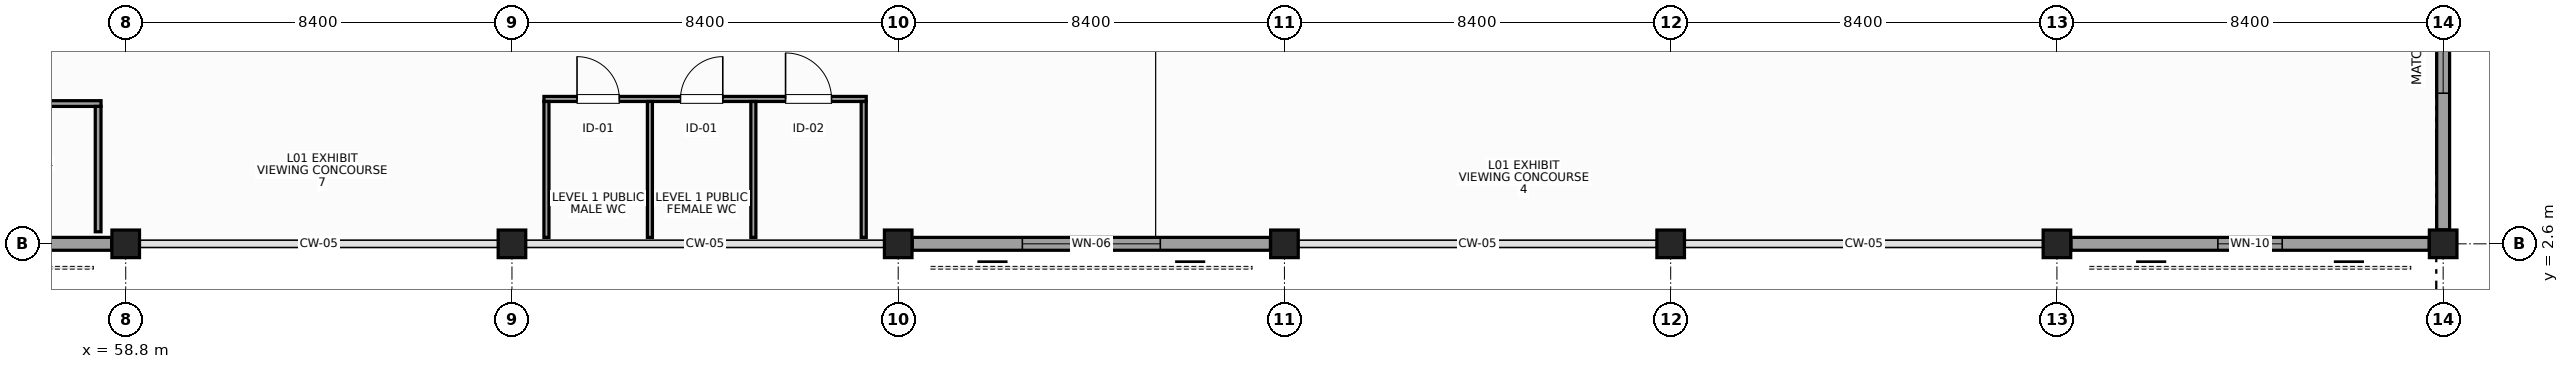
"""IFC4 building model, lengths in metres.
Left out: names, types, materials, properties, quantities, classifications, styles, units other than length and angle.
Written with IfcOpenShell. Run it as: python <this file> out.ifc"""

import sys

from ifc_helpers import new_model, si_unit, direction, frame, frame_2d, origin, origin_2d, place, context, subcontext, project, spatial, rectangle, extrude, element, fill, save


model = new_model("IFC4")
c1 = context("Model", 3, precision=1e-05, world=origin(), true_north=direction((0.0, 1.0)))
c2 = subcontext(c1, "Body", "Model", "MODEL_VIEW")
j1 = project(units=[si_unit("LENGTHUNIT", "METRE"), si_unit("PLANEANGLEUNIT", "RADIAN")], contexts=[c1])
p1 = place(None, origin())
s1 = spatial("IfcSite", under=j1, at=p1, CompositionType="ELEMENT")
p2 = place(p1, origin())
s2 = spatial("IfcBuilding", under=s1, at=p2, CompositionType="ELEMENT")
p3 = place(p2, frame((0.0, 0.0, 5.4)))
s3 = spatial("IfcBuildingStorey", under=s2, at=p3, CompositionType="ELEMENT", Elevation=5.4)
for number, where, z_axis, x_axis in (
    (1, (58.8, 2.6, 0.0), (0.0, 0.0, 1.0), (1.0, 0.0, 0.0)),
    (2, (67.2, 2.6, 0.0), (0.0, 0.0, 1.0), (1.0, 0.0, 0.0)),
    (3, (75.6, 2.6, 0.0), (0.0, 0.0, 1.0), (1.0, 0.0, 0.0)),
    (4, (84.0, 2.6, 0.0), (0.0, 0.0, 1.0), (1.0, 0.0, 0.0)),
    (5, (92.4, 2.6, 0.0), (0.0, 0.0, 1.0), (1.0, 0.0, 0.0)),
    (6, (100.8, 2.6, 0.0), (0.0, 0.0, 1.0), (1.0, 0.0, 0.0)),
    (7, (109.2, 2.6, 0.0), (0.0, 0.0, 1.0), (1.0, 0.0, 0.0)),
):
    element("IfcColumn", number, at=place(p3, frame(where, z_axis=z_axis, x_axis=x_axis)), inside=s3, PredefinedType="COLUMN", context=c2, shape_type="SweptSolid", body=[
        extrude(rectangle(XDim=0.6, YDim=0.6, at=origin_2d()), origin(), (0.0, 0.0, 1.0), 5.4),
    ])
p4 = place(p3, frame((50.705, 2.6, 0.0), z_axis=(0.0, 0.0, 1.0), x_axis=(1.0, 0.0, 0.0)))
e8 = element("IfcWall", 8, at=p4, inside=s3, PredefinedType="STANDARD", context=c2, shape_type="SweptSolid", body=[
    extrude(rectangle(XDim=7.79, YDim=0.28, at=frame_2d((3.895, 0.0))), origin(), (0.0, 0.0, 1.0), 4.23),
])
p5 = place(p4, frame((2.695, 0.0, 0.95)))
e9 = element("IfcOpeningElement", 9, at=p5, cuts=e8, PredefinedType="OPENING", context=c2, shape_type="SweptSolid", body=[
    extrude(rectangle(XDim=2.4, YDim=2.4, at=frame_2d((1.2, 1.2))), frame((0.0, 0.15, 0.0), z_axis=(0.0, -1.0, 0.0), x_axis=(1.0, 0.0, 0.0)), (0.0, 0.0, 1.0), 0.3),
])
p6 = place(p3, frame((75.905, 2.6, 0.0), z_axis=(0.0, 0.0, 1.0), x_axis=(1.0, 0.0, 0.0)))
e10 = element("IfcWall", 10, at=p6, inside=s3, PredefinedType="STANDARD", context=c2, shape_type="SweptSolid", body=[
    extrude(rectangle(XDim=7.79, YDim=0.28, at=frame_2d((3.895, 0.0))), origin(), (0.0, 0.0, 1.0), 4.23),
])
p7 = place(p6, frame((2.395, 0.0, 0.95)))
e11 = element("IfcOpeningElement", 11, at=p7, cuts=e10, PredefinedType="OPENING", context=c2, shape_type="SweptSolid", body=[
    extrude(rectangle(XDim=3.0, YDim=1.8, at=frame_2d((1.5, 0.9))), frame((0.0, 0.15, 0.0), z_axis=(0.0, -1.0, 0.0), x_axis=(1.0, 0.0, 0.0)), (0.0, 0.0, 1.0), 0.3),
])
p8 = place(p3, frame((101.105, 2.6, 0.0), z_axis=(0.0, 0.0, 1.0), x_axis=(1.0, 0.0, 0.0)))
e12 = element("IfcWall", 12, at=p8, inside=s3, PredefinedType="STANDARD", context=c2, shape_type="SweptSolid", body=[
    extrude(rectangle(XDim=7.79, YDim=0.28, at=frame_2d((3.895, 0.0))), origin(), (0.0, 0.0, 1.0), 4.23),
])
p9 = place(p8, frame((3.195, 0.0, 0.95)))
e13 = element("IfcOpeningElement", 13, at=p9, cuts=e12, PredefinedType="OPENING", context=c2, shape_type="SweptSolid", body=[
    extrude(rectangle(XDim=1.4, YDim=1.6, at=frame_2d((0.7, 0.8))), frame((0.0, 0.15, 0.0), z_axis=(0.0, -1.0, 0.0), x_axis=(1.0, 0.0, 0.0)), (0.0, 0.0, 1.0), 0.3),
])
p10 = place(p3, frame((109.2, 2.905, 0.0), z_axis=(0.0, 0.0, 1.0), x_axis=(0.0, 1.0, 0.0)))
e14 = element("IfcWall", 14, at=p10, inside=s3, PredefinedType="STANDARD", context=c2, shape_type="SweptSolid", body=[
    extrude(rectangle(XDim=8.34, YDim=0.28, at=frame_2d((4.17, 0.0))), origin(), (0.0, 0.0, 1.0), 4.25),
])
p11 = place(p10, frame((2.97, 0.0, 0.95)))
e15 = element("IfcOpeningElement", 15, at=p11, cuts=e14, PredefinedType="OPENING", context=c2, shape_type="SweptSolid", body=[
    extrude(rectangle(XDim=2.4, YDim=2.4, at=frame_2d((1.2, 1.2))), frame((0.0, 0.15, 0.0), z_axis=(0.0, -1.0, 0.0), x_axis=(1.0, 0.0, 0.0)), (0.0, 0.0, 1.0), 0.3),
])
p12 = place(p3, frame((67.895, 5.75, 0.0), z_axis=(0.0, 0.0, 1.0), x_axis=(1.0, 0.0, 0.0)))
e16 = element("IfcWall", 16, at=p12, inside=s3, PredefinedType="PARTITIONING", context=c2, shape_type="SweptSolid", body=[
    extrude(rectangle(XDim=7.01, YDim=0.11, at=frame_2d((3.505, 0.0))), origin(), (0.0, 0.0, 1.0), 2.622),
])
p13 = place(p12, frame((0.72, 0.0, 0.0)))
e17 = element("IfcOpeningElement", 17, at=p13, cuts=e16, PredefinedType="OPENING", context=c2, shape_type="SweptSolid", body=[
    extrude(rectangle(XDim=0.92, YDim=2.1, at=frame_2d((0.46, 1.05))), frame((0.0, 0.065, 0.0), z_axis=(0.0, -1.0, 0.0), x_axis=(1.0, 0.0, 0.0)), (0.0, 0.0, 1.0), 0.13),
])
p14 = place(p12, frame((2.97, 0.0, 0.0)))
e18 = element("IfcOpeningElement", 18, at=p14, cuts=e16, PredefinedType="OPENING", context=c2, shape_type="SweptSolid", body=[
    extrude(rectangle(XDim=0.92, YDim=2.1, at=frame_2d((0.46, 1.05))), frame((0.0, 0.065, 0.0), z_axis=(0.0, -1.0, 0.0), x_axis=(1.0, 0.0, 0.0)), (0.0, 0.0, 1.0), 0.13),
])
p15 = place(p12, frame((5.255, 0.0, 0.0)))
e19 = element("IfcOpeningElement", 19, at=p15, cuts=e16, PredefinedType="OPENING", context=c2, shape_type="SweptSolid", body=[
    extrude(rectangle(XDim=1.0, YDim=2.15, at=frame_2d((0.5, 1.075))), frame((0.0, 0.065, 0.0), z_axis=(0.0, -1.0, 0.0), x_axis=(1.0, 0.0, 0.0)), (0.0, 0.0, 1.0), 0.13),
])
for number, where, z_axis, x_axis in (
    (20, (67.95, 2.74, 0.0), (0.0, 0.0, 1.0), (0.0, 1.0, 0.0)),
    (21, (70.2, 2.74, 0.0), (0.0, 0.0, 1.0), (0.0, 1.0, 0.0)),
    (22, (72.45, 2.74, 0.0), (0.0, 0.0, 1.0), (0.0, 1.0, 0.0)),
    (23, (74.85, 2.74, 0.0), (0.0, 0.0, 1.0), (0.0, 1.0, 0.0)),
):
    element("IfcWall", number, at=place(p3, frame(where, z_axis=z_axis, x_axis=x_axis)), inside=s3, PredefinedType="PARTITIONING", context=c2, shape_type="SweptSolid", body=[
        extrude(rectangle(XDim=2.955, YDim=0.11, at=frame_2d((1.478, 0.0))), origin(), (0.0, 0.0, 1.0), 2.622),
    ])
p16 = place(p3, frame((33.938, 5.65, 0.0), z_axis=(0.0, 0.0, 1.0), x_axis=(1.0, 0.0, 0.0)))
e24 = element("IfcWall", 24, at=p16, inside=s3, PredefinedType="PARTITIONING", context=c2, shape_type="SweptSolid", body=[
    extrude(rectangle(XDim=24.325, YDim=0.125, at=frame_2d((12.163, 0.0))), origin(), (0.0, 0.0, 1.0), 4.35),
])
p17 = place(p16, frame((11.282, 0.0, 0.0)))
e25 = element("IfcOpeningElement", 25, at=p17, cuts=e24, PredefinedType="OPENING", context=c2, shape_type="SweptSolid", body=[
    extrude(rectangle(XDim=1.76, YDim=2.45, at=frame_2d((0.88, 1.225))), frame((0.0, 0.073, 0.0), z_axis=(0.0, -1.0, 0.0), x_axis=(1.0, 0.0, 0.0)), (0.0, 0.0, 1.0), 0.145),
])
p18 = place(p16, frame((13.642, 0.0, 1.05)))
e26 = element("IfcOpeningElement", 26, at=p18, cuts=e24, PredefinedType="OPENING", context=c2, shape_type="SweptSolid", body=[
    extrude(rectangle(XDim=2.25, YDim=1.6, at=frame_2d((1.125, 0.8))), frame((0.0, 0.073, 0.0), z_axis=(0.0, -1.0, 0.0), x_axis=(1.0, 0.0, 0.0)), (0.0, 0.0, 1.0), 0.145),
])
p19 = place(p3, frame((58.2, 2.862, 0.0), z_axis=(0.0, 0.0, 1.0), x_axis=(0.0, 1.0, 0.0)))
e27 = element("IfcWall", 27, at=p19, inside=s3, PredefinedType="PARTITIONING", context=c2, shape_type="SweptSolid", body=[
    extrude(rectangle(XDim=2.726, YDim=0.125, at=frame_2d((1.363, 0.0))), origin(), (0.0, 0.0, 1.0), 4.23),
])
p20 = place(p7, origin())
e28 = element("IfcWindow", 28, at=p20, inside=s3, PartitioningType="SINGLE_PANEL", PredefinedType="WINDOW", context=c2, shape_type="SweptSolid", body=[
    extrude(rectangle(XDim=3.0, YDim=1.8, at=frame_2d((1.5, 0.9))), frame((0.0, 0.03, 0.0), z_axis=(0.0, -1.0, 0.0), x_axis=(1.0, 0.0, 0.0)), (0.0, 0.0, 1.0), 0.06),
])
fill(e11, e28)
p21 = place(p9, origin())
e29 = element("IfcWindow", 29, at=p21, inside=s3, PartitioningType="SINGLE_PANEL", PredefinedType="WINDOW", context=c2, shape_type="SweptSolid", body=[
    extrude(rectangle(XDim=1.4, YDim=1.6, at=frame_2d((0.7, 0.8))), frame((0.0, 0.03, 0.0), z_axis=(0.0, -1.0, 0.0), x_axis=(1.0, 0.0, 0.0)), (0.0, 0.0, 1.0), 0.06),
])
fill(e13, e29)
p22 = place(p11, origin())
e30 = element("IfcWindow", 30, at=p22, inside=s3, PartitioningType="SINGLE_PANEL", PredefinedType="WINDOW", context=c2, shape_type="SweptSolid", body=[
    extrude(rectangle(XDim=2.4, YDim=2.4, at=frame_2d((1.2, 1.2))), frame((0.0, 0.03, 0.0), z_axis=(0.0, -1.0, 0.0), x_axis=(1.0, 0.0, 0.0)), (0.0, 0.0, 1.0), 0.06),
])
fill(e15, e30)
p23 = place(p13, origin())
e31 = element("IfcDoor", 31, at=p23, inside=s3, OperationType="SINGLE_SWING_LEFT", PredefinedType="DOOR", context=c2, shape_type="SweptSolid", body=[
    extrude(rectangle(XDim=0.92, YDim=2.1, at=frame_2d((0.46, 1.05))), frame((0.0, 0.025, 0.0), z_axis=(0.0, -1.0, 0.0), x_axis=(1.0, 0.0, 0.0)), (0.0, 0.0, 1.0), 0.05),
])
fill(e17, e31)
p24 = place(p14, origin())
e32 = element("IfcDoor", 32, at=p24, inside=s3, OperationType="SINGLE_SWING_RIGHT", PredefinedType="DOOR", context=c2, shape_type="SweptSolid", body=[
    extrude(rectangle(XDim=0.92, YDim=2.1, at=frame_2d((0.46, 1.05))), frame((0.0, 0.025, 0.0), z_axis=(0.0, -1.0, 0.0), x_axis=(1.0, 0.0, 0.0)), (0.0, 0.0, 1.0), 0.05),
])
fill(e18, e32)
p25 = place(p15, origin())
e33 = element("IfcDoor", 33, at=p25, inside=s3, OperationType="SINGLE_SWING_LEFT", PredefinedType="DOOR", context=c2, shape_type="SweptSolid", body=[
    extrude(rectangle(XDim=1.0, YDim=2.15, at=frame_2d((0.5, 1.075))), frame((0.0, 0.025, 0.0), z_axis=(0.0, -1.0, 0.0), x_axis=(1.0, 0.0, 0.0)), (0.0, 0.0, 1.0), 0.05),
])
fill(e19, e33)
save(model, sys.argv[1])
